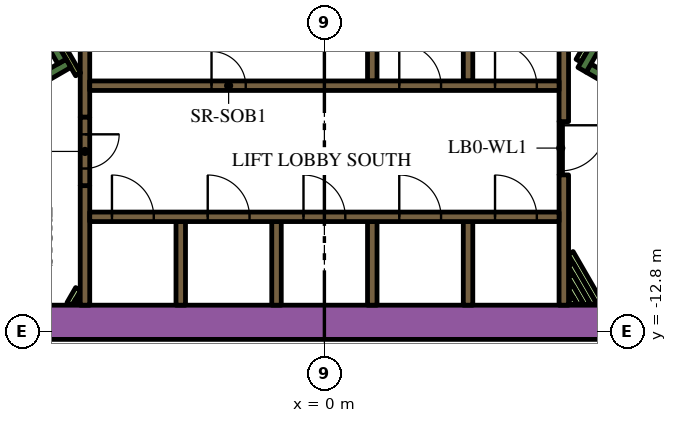
"""IFC4 building model, lengths in metres.
Left out: names, types, materials, properties, quantities, classifications, styles, units other than length and angle.
Written with IfcOpenShell. Run it as: python <this file> out.ifc"""

import sys

from ifc_helpers import new_model, si_unit, direction, frame, frame_2d, origin, place, context, subcontext, project, spatial, rectangle, extrude, element, fill, save


model = new_model("IFC4")
c1 = context("Model", 3, precision=1e-05, world=origin(), true_north=direction((0.0, 1.0)))
c2 = subcontext(c1, "Body", "Model", "MODEL_VIEW")
j1 = project(units=[si_unit("LENGTHUNIT", "METRE"), si_unit("PLANEANGLEUNIT", "RADIAN")], contexts=[c1])
p1 = place(None, origin())
s1 = spatial("IfcSite", under=j1, at=p1, CompositionType="ELEMENT")
p2 = place(p1, origin())
s2 = spatial("IfcBuilding", under=s1, at=p2, CompositionType="ELEMENT")
p3 = place(p2, frame((0.0, 0.0, 43.2)))
s3 = spatial("IfcBuildingStorey", under=s2, at=p3, CompositionType="ELEMENT", Elevation=43.2)
p4 = place(p3, frame((-12.019, -12.55, 0.0), z_axis=(0.0, 0.0, 1.0), x_axis=(1.0, 0.0, 0.0)))
e1 = element("IfcWall", 1, at=p4, inside=s3, PredefinedType="SOLIDWALL", context=c2, shape_type="SweptSolid", body=[
    extrude(rectangle(XDim=22.083, YDim=0.9, at=frame_2d((11.042, 0.0))), origin(), (0.0, 0.0, 1.0), 3.9),
])
p5 = place(p3, frame((12.84, -9.261, 0.0), z_axis=(0.0, 0.0, 1.0), x_axis=(-0.866013990052, 0.500019768644, 0.0)))
e2 = element("IfcWall", 2, at=p5, inside=s3, PredefinedType="SOLIDWALL", context=c2, shape_type="SweptSolid", body=[
    extrude(rectangle(XDim=6.8, YDim=0.25, at=frame_2d((3.4, 0.0))), origin(), (0.0, 0.0, 1.0), 3.9),
])
p6 = place(p3, frame((6.78, -5.906, 0.0), z_axis=(0.0, 0.0, 1.0), x_axis=(0.500223362819, 0.865896406789, 0.0)))
e3 = element("IfcWall", 3, at=p6, inside=s3, PredefinedType="SOLIDWALL", context=c2, shape_type="SweptSolid", body=[
    extrude(rectangle(XDim=0.675, YDim=0.25, at=frame_2d((0.337, 0.0))), origin(), (0.0, 0.0, 1.0), 3.9),
])
p7 = place(p3, frame((-12.84, -9.261, 0.0), z_axis=(0.0, 0.0, 1.0), x_axis=(0.866016039709, 0.500016218704, 0.0)))
e4 = element("IfcWall", 4, at=p7, inside=s3, PredefinedType="SOLIDWALL", context=c2, shape_type="SweptSolid", body=[
    extrude(rectangle(XDim=7.05, YDim=0.25, at=frame_2d((3.525, 0.0))), origin(), (0.0, 0.0, 1.0), 3.9),
])
p8 = place(p3, frame((-6.905, -5.69, 0.0), z_axis=(0.0, 0.0, 1.0), x_axis=(-0.500402024738, 0.865793170242, 0.0)))
e5 = element("IfcWall", 5, at=p8, inside=s3, PredefinedType="SOLIDWALL", context=c2, shape_type="SweptSolid", body=[
    extrude(rectangle(XDim=0.425, YDim=0.25, at=frame_2d((0.212, 0.0))), origin(), (0.0, 0.0, 1.0), 3.9),
])
p9 = place(p3, frame((-3.78, -12.1, 0.0), z_axis=(0.0, 0.0, 1.0), x_axis=(0.0, 1.0, 0.0)))
e6 = element("IfcWall", 6, at=p9, inside=s3, PredefinedType="SOLIDWALL", context=c2, shape_type="SweptSolid", body=[
    extrude(rectangle(XDim=2.2, YDim=0.25, at=frame_2d((1.1, 0.0))), origin(), (0.0, 0.0, 1.0), 3.9),
])
p10 = place(p3, frame((-6.3, -12.1, 0.0), z_axis=(0.0, 0.0, 1.0), x_axis=(0.0, 1.0, 0.0)))
e7 = element("IfcWall", 7, at=p10, inside=s3, PredefinedType="SOLIDWALL", context=c2, shape_type="SweptSolid", body=[
    extrude(rectangle(XDim=3.146, YDim=0.25, at=frame_2d((1.573, 0.0))), origin(), (0.0, 0.0, 1.0), 3.9),
])
for number, where, z_axis, x_axis in (
    (8, (3.78, -4.0, 0.0), (0.0, 0.0, 1.0), (0.0, -1.0, 0.0)),
    (9, (1.26, -4.0, 0.0), (0.0, 0.0, 1.0), (0.0, -1.0, 0.0)),
):
    element("IfcWall", number, at=place(p3, frame(where, z_axis=z_axis, x_axis=x_axis)), inside=s3, PredefinedType="SOLIDWALL", context=c2, shape_type="SweptSolid", body=[
        extrude(rectangle(XDim=2.2, YDim=0.25, at=frame_2d((1.1, 0.0))), origin(), (0.0, 0.0, 1.0), 3.9),
    ])
p11 = place(p3, frame((-6.3, -3.75, 0.0), z_axis=(0.0, 0.0, 1.0), x_axis=(0.0, -1.0, 0.0)))
e10 = element("IfcWall", 10, at=p11, inside=s3, PredefinedType="SOLIDWALL", context=c2, shape_type="SweptSolid", body=[
    extrude(rectangle(XDim=3.404, YDim=0.25, at=frame_2d((1.702, 0.0))), origin(), (0.0, 0.0, 1.0), 3.9),
])
p12 = place(p3, frame((6.3, -7.27, 0.0), z_axis=(0.0, 0.0, 1.0), x_axis=(0.0, 1.0, 0.0)))
e11 = element("IfcWall", 11, at=p12, inside=s3, PredefinedType="SOLIDWALL", context=c2, shape_type="SweptSolid", body=[
    extrude(rectangle(XDim=3.586, YDim=0.25, at=frame_2d((1.793, 0.0))), origin(), (0.0, 0.0, 1.0), 3.9),
])
p13 = place(p3, frame((6.3, -12.1, 0.0), z_axis=(0.0, 0.0, 1.0), x_axis=(0.0, 1.0, 0.0)))
e12 = element("IfcWall", 12, at=p13, inside=s3, PredefinedType="SOLIDWALL", context=c2, shape_type="SweptSolid", body=[
    extrude(rectangle(XDim=3.428, YDim=0.25, at=frame_2d((1.714, 0.0))), origin(), (0.0, 0.0, 1.0), 3.9),
])
for number, where, z_axis, x_axis in (
    (13, (3.78, -12.1, 0.0), (0.0, 0.0, 1.0), (0.0, 1.0, 0.0)),
    (14, (1.26, -12.1, 0.0), (0.0, 0.0, 1.0), (0.0, 1.0, 0.0)),
    (15, (-1.26, -12.1, 0.0), (0.0, 0.0, 1.0), (0.0, 1.0, 0.0)),
):
    element("IfcWall", number, at=place(p3, frame(where, z_axis=z_axis, x_axis=x_axis)), inside=s3, PredefinedType="SOLIDWALL", context=c2, shape_type="SweptSolid", body=[
        extrude(rectangle(XDim=2.2, YDim=0.25, at=frame_2d((1.1, 0.0))), origin(), (0.0, 0.0, 1.0), 3.9),
    ])
p14 = place(p3, frame((-6.708, -12.068, 0.0), z_axis=(0.0, 0.0, 1.0), x_axis=(0.500000789788, 0.8660249478, 0.0)))
e16 = element("IfcWall", 16, at=p14, inside=s3, PredefinedType="PARTITIONING", context=c2, shape_type="SweptSolid", body=[
    extrude(rectangle(XDim=0.456, YDim=0.15, at=frame_2d((0.228, 0.0))), origin(), (0.0, 0.0, 1.0), 2.75),
])
p15 = place(p3, frame((-6.534, -12.068, 0.0), z_axis=(0.0, 0.0, 1.0), x_axis=(0.500240224089, 0.865886665912, 0.0)))
e17 = element("IfcWall", 17, at=p15, inside=s3, PredefinedType="PARTITIONING", context=c2, shape_type="SweptSolid", body=[
    extrude(rectangle(XDim=0.109, YDim=0.15, at=frame_2d((0.054, 0.0))), origin(), (0.0, 0.0, 1.0), 2.75),
])
p16 = place(p3, frame((-6.48, -6.027, 0.0), z_axis=(0.0, 0.0, 1.0), x_axis=(-0.499927229454, 0.866067413802, 0.0)))
e18 = element("IfcWall", 18, at=p16, inside=s3, PredefinedType="PARTITIONING", context=c2, shape_type="SweptSolid", body=[
    extrude(rectangle(XDim=0.929, YDim=0.15, at=frame_2d((0.464, 0.0))), origin(), (0.0, 0.0, 1.0), 3.9),
])
p17 = place(p3, frame((6.48, -10.726, 0.0), z_axis=(0.0, 0.0, 1.0), x_axis=(0.500017819788, -0.86601511528, 0.0)))
e19 = element("IfcWall", 19, at=p17, inside=s3, PredefinedType="PARTITIONING", context=c2, shape_type="SweptSolid", body=[
    extrude(rectangle(XDim=1.55, YDim=0.15, at=frame_2d((0.775, 0.0))), origin(), (0.0, 0.0, 1.0), 2.75),
])
p18 = place(p3, frame((6.48, -11.026, 0.0), z_axis=(0.0, 0.0, 1.0), x_axis=(0.49995654735, -0.86605048973, 0.0)))
e20 = element("IfcWall", 20, at=p18, inside=s3, PredefinedType="PARTITIONING", context=c2, shape_type="SweptSolid", body=[
    extrude(rectangle(XDim=1.204, YDim=0.15, at=frame_2d((0.602, 0.0))), origin(), (0.0, 0.0, 1.0), 2.75),
])
p19 = place(p3, frame((6.48, -11.326, 0.0), z_axis=(0.0, 0.0, 1.0), x_axis=(0.500059337743, -0.865991142412, 0.0)))
e21 = element("IfcWall", 21, at=p19, inside=s3, PredefinedType="PARTITIONING", context=c2, shape_type="SweptSolid", body=[
    extrude(rectangle(XDim=0.857, YDim=0.15, at=frame_2d((0.429, 0.0))), origin(), (0.0, 0.0, 1.0), 2.75),
])
p20 = place(p3, frame((6.48, -11.626, 0.0), z_axis=(0.0, 0.0, 1.0), x_axis=(0.500301480982, -0.865851273677, 0.0)))
e22 = element("IfcWall", 22, at=p20, inside=s3, PredefinedType="PARTITIONING", context=c2, shape_type="SweptSolid", body=[
    extrude(rectangle(XDim=0.511, YDim=0.15, at=frame_2d((0.255, 0.0))), origin(), (0.0, 0.0, 1.0), 2.75),
])
p21 = place(p3, frame((6.48, -11.926, 0.0), z_axis=(0.0, 0.0, 1.0), x_axis=(0.500450775723, -0.86576499183, 0.0)))
e23 = element("IfcWall", 23, at=p21, inside=s3, PredefinedType="PARTITIONING", context=c2, shape_type="SweptSolid", body=[
    extrude(rectangle(XDim=0.164, YDim=0.15, at=frame_2d((0.082, 0.0))), origin(), (0.0, 0.0, 1.0), 2.75),
])
p22 = place(p3, frame((6.945, -5.222, 0.0), z_axis=(0.0, 0.0, 1.0), x_axis=(-0.499818422106, -0.866130212453, 0.0)))
e24 = element("IfcWall", 24, at=p22, inside=s3, PredefinedType="PARTITIONING", context=c2, shape_type="SweptSolid", body=[
    extrude(rectangle(XDim=0.514, YDim=0.15, at=frame_2d((0.257, 0.0))), origin(), (0.0, 0.0, 1.0), 2.75),
])
p23 = place(p3, frame((-6.175, -9.775, 0.0), z_axis=(0.0, 0.0, 1.0), x_axis=(1.0, 0.0, 0.0)))
e25 = element("IfcWall", 25, at=p23, inside=s3, PredefinedType="SOLIDWALL", context=c2, shape_type="SweptSolid", body=[
    extrude(rectangle(XDim=12.35, YDim=0.25, at=frame_2d((6.175, 0.0))), origin(), (0.0, 0.0, 1.0), 3.9),
])
p24 = place(p23, frame((0.585, 0.0, 0.0)))
e26 = element("IfcOpeningElement", 26, at=p24, cuts=e25, PredefinedType="OPENING", context=c2, shape_type="SweptSolid", body=[
    extrude(rectangle(XDim=1.1, YDim=2.1, at=frame_2d((0.55, 1.05))), frame((0.0, 0.135, 0.0), z_axis=(0.0, -1.0, 0.0), x_axis=(1.0, 0.0, 0.0)), (0.0, 0.0, 1.0), 0.27),
])
p25 = place(p23, frame((3.105, 0.0, 0.0)))
e27 = element("IfcOpeningElement", 27, at=p25, cuts=e25, PredefinedType="OPENING", context=c2, shape_type="SweptSolid", body=[
    extrude(rectangle(XDim=1.1, YDim=2.1, at=frame_2d((0.55, 1.05))), frame((0.0, 0.135, 0.0), z_axis=(0.0, -1.0, 0.0), x_axis=(1.0, 0.0, 0.0)), (0.0, 0.0, 1.0), 0.27),
])
p26 = place(p23, frame((5.625, 0.0, 0.0)))
e28 = element("IfcOpeningElement", 28, at=p26, cuts=e25, PredefinedType="OPENING", context=c2, shape_type="SweptSolid", body=[
    extrude(rectangle(XDim=1.1, YDim=2.1, at=frame_2d((0.55, 1.05))), frame((0.0, 0.135, 0.0), z_axis=(0.0, -1.0, 0.0), x_axis=(1.0, 0.0, 0.0)), (0.0, 0.0, 1.0), 0.27),
])
p27 = place(p23, frame((8.145, 0.0, 0.0)))
e29 = element("IfcOpeningElement", 29, at=p27, cuts=e25, PredefinedType="OPENING", context=c2, shape_type="SweptSolid", body=[
    extrude(rectangle(XDim=1.1, YDim=2.1, at=frame_2d((0.55, 1.05))), frame((0.0, 0.135, 0.0), z_axis=(0.0, -1.0, 0.0), x_axis=(1.0, 0.0, 0.0)), (0.0, 0.0, 1.0), 0.27),
])
p28 = place(p23, frame((10.665, 0.0, 0.0)))
e30 = element("IfcOpeningElement", 30, at=p28, cuts=e25, PredefinedType="OPENING", context=c2, shape_type="SweptSolid", body=[
    extrude(rectangle(XDim=1.1, YDim=2.1, at=frame_2d((0.55, 1.05))), frame((0.0, 0.135, 0.0), z_axis=(0.0, -1.0, 0.0), x_axis=(1.0, 0.0, 0.0)), (0.0, 0.0, 1.0), 0.27),
])
p29 = place(p3, frame((-6.175, -6.325, 0.0), z_axis=(0.0, 0.0, 1.0), x_axis=(1.0, 0.0, 0.0)))
e31 = element("IfcWall", 31, at=p29, inside=s3, PredefinedType="SOLIDWALL", context=c2, shape_type="SweptSolid", body=[
    extrude(rectangle(XDim=12.35, YDim=0.25, at=frame_2d((6.175, 0.0))), origin(), (0.0, 0.0, 1.0), 3.9),
])
p30 = place(p29, frame((3.205, 0.0, 0.0)))
e32 = element("IfcOpeningElement", 32, at=p30, cuts=e31, PredefinedType="OPENING", context=c2, shape_type="SweptSolid", body=[
    extrude(rectangle(XDim=0.9, YDim=2.1, at=frame_2d((0.45, 1.05))), frame((0.0, 0.135, 0.0), z_axis=(0.0, -1.0, 0.0), x_axis=(1.0, 0.0, 0.0)), (0.0, 0.0, 1.0), 0.27),
])
p31 = place(p29, frame((8.145, 0.0, 0.0)))
e33 = element("IfcOpeningElement", 33, at=p31, cuts=e31, PredefinedType="OPENING", context=c2, shape_type="SweptSolid", body=[
    extrude(rectangle(XDim=1.1, YDim=2.1, at=frame_2d((0.55, 1.05))), frame((0.0, 0.135, 0.0), z_axis=(0.0, -1.0, 0.0), x_axis=(1.0, 0.0, 0.0)), (0.0, 0.0, 1.0), 0.27),
])
p32 = place(p29, frame((10.665, 0.0, 0.0)))
e34 = element("IfcOpeningElement", 34, at=p32, cuts=e31, PredefinedType="OPENING", context=c2, shape_type="SweptSolid", body=[
    extrude(rectangle(XDim=1.1, YDim=2.1, at=frame_2d((0.55, 1.05))), frame((0.0, 0.135, 0.0), z_axis=(0.0, -1.0, 0.0), x_axis=(1.0, 0.0, 0.0)), (0.0, 0.0, 1.0), 0.27),
])
p33 = place(p3, frame((-6.3, -7.154, 0.0), z_axis=(0.0, 0.0, 1.0), x_axis=(0.0, -1.0, 0.0)))
e35 = element("IfcWall", 35, at=p33, inside=s3, PredefinedType="SOLIDWALL", context=c2, shape_type="SweptSolid", body=[
    extrude(rectangle(XDim=1.8, YDim=0.25, at=frame_2d((0.9, 0.0))), origin(), (0.0, 0.0, 1.0), 3.9),
])
p34 = place(p33, frame((0.45, 0.0, 0.0)))
e36 = element("IfcOpeningElement", 36, at=p34, cuts=e35, PredefinedType="OPENING", context=c2, shape_type="SweptSolid", body=[
    extrude(rectangle(XDim=0.9, YDim=2.1, at=frame_2d((0.45, 1.05))), frame((0.0, 0.135, 0.0), z_axis=(0.0, -1.0, 0.0), x_axis=(1.0, 0.0, 0.0)), (0.0, 0.0, 1.0), 0.27),
])
p35 = place(p3, frame((6.22, -7.266, 0.0), z_axis=(0.0, 0.0, 1.0), x_axis=(0.0, -1.0, 0.0)))
e37 = element("IfcWall", 37, at=p35, inside=s3, PredefinedType="PARTITIONING", context=c2, shape_type="SweptSolid", body=[
    extrude(rectangle(XDim=1.4, YDim=0.09, at=frame_2d((0.7, 0.0))), origin(), (0.0, 0.0, 1.0), 2.75),
])
p36 = place(p35, frame((0.1, 0.0, 0.0)))
e38 = element("IfcOpeningElement", 38, at=p36, cuts=e37, PredefinedType="OPENING", context=c2, shape_type="SweptSolid", body=[
    extrude(rectangle(XDim=1.2, YDim=2.1, at=frame_2d((0.6, 1.05))), frame((0.0, 0.055, 0.0), z_axis=(0.0, -1.0, 0.0), x_axis=(1.0, 0.0, 0.0)), (0.0, 0.0, 1.0), 0.11),
])
p37 = place(p24, origin())
e39 = element("IfcDoor", 39, at=p37, inside=s3, OperationType="DOUBLE_DOOR_SLIDING", PredefinedType="DOOR", context=c2, shape_type="SweptSolid", body=[
    extrude(rectangle(XDim=1.1, YDim=2.1, at=frame_2d((0.55, 1.05))), frame((0.0, 0.025, 0.0), z_axis=(0.0, -1.0, 0.0), x_axis=(1.0, 0.0, 0.0)), (0.0, 0.0, 1.0), 0.05),
])
fill(e26, e39)
p38 = place(p25, origin())
e40 = element("IfcDoor", 40, at=p38, inside=s3, OperationType="DOUBLE_DOOR_SLIDING", PredefinedType="DOOR", context=c2, shape_type="SweptSolid", body=[
    extrude(rectangle(XDim=1.1, YDim=2.1, at=frame_2d((0.55, 1.05))), frame((0.0, 0.025, 0.0), z_axis=(0.0, -1.0, 0.0), x_axis=(1.0, 0.0, 0.0)), (0.0, 0.0, 1.0), 0.05),
])
fill(e27, e40)
p39 = place(p26, origin())
e41 = element("IfcDoor", 41, at=p39, inside=s3, OperationType="DOUBLE_DOOR_SLIDING", PredefinedType="DOOR", context=c2, shape_type="SweptSolid", body=[
    extrude(rectangle(XDim=1.1, YDim=2.1, at=frame_2d((0.55, 1.05))), frame((0.0, 0.025, 0.0), z_axis=(0.0, -1.0, 0.0), x_axis=(1.0, 0.0, 0.0)), (0.0, 0.0, 1.0), 0.05),
])
fill(e28, e41)
p40 = place(p27, origin())
e42 = element("IfcDoor", 42, at=p40, inside=s3, OperationType="DOUBLE_DOOR_SLIDING", PredefinedType="DOOR", context=c2, shape_type="SweptSolid", body=[
    extrude(rectangle(XDim=1.1, YDim=2.1, at=frame_2d((0.55, 1.05))), frame((0.0, 0.025, 0.0), z_axis=(0.0, -1.0, 0.0), x_axis=(1.0, 0.0, 0.0)), (0.0, 0.0, 1.0), 0.05),
])
fill(e29, e42)
p41 = place(p28, origin())
e43 = element("IfcDoor", 43, at=p41, inside=s3, OperationType="DOUBLE_DOOR_SLIDING", PredefinedType="DOOR", context=c2, shape_type="SweptSolid", body=[
    extrude(rectangle(XDim=1.1, YDim=2.1, at=frame_2d((0.55, 1.05))), frame((0.0, 0.025, 0.0), z_axis=(0.0, -1.0, 0.0), x_axis=(1.0, 0.0, 0.0)), (0.0, 0.0, 1.0), 0.05),
])
fill(e30, e43)
p42 = place(p30, origin())
e44 = element("IfcDoor", 44, at=p42, inside=s3, OperationType="SINGLE_SWING_LEFT", PredefinedType="DOOR", context=c2, shape_type="SweptSolid", body=[
    extrude(rectangle(XDim=0.9, YDim=2.1, at=frame_2d((0.45, 1.05))), frame((0.0, 0.025, 0.0), z_axis=(0.0, -1.0, 0.0), x_axis=(1.0, 0.0, 0.0)), (0.0, 0.0, 1.0), 0.05),
])
fill(e32, e44)
p43 = place(p31, origin())
e45 = element("IfcDoor", 45, at=p43, inside=s3, OperationType="DOUBLE_DOOR_SLIDING", PredefinedType="DOOR", context=c2, shape_type="SweptSolid", body=[
    extrude(rectangle(XDim=1.1, YDim=2.1, at=frame_2d((0.55, 1.05))), frame((0.0, 0.025, 0.0), z_axis=(0.0, -1.0, 0.0), x_axis=(1.0, 0.0, 0.0)), (0.0, 0.0, 1.0), 0.05),
])
fill(e33, e45)
p44 = place(p32, origin())
e46 = element("IfcDoor", 46, at=p44, inside=s3, OperationType="DOUBLE_DOOR_SLIDING", PredefinedType="DOOR", context=c2, shape_type="SweptSolid", body=[
    extrude(rectangle(XDim=1.1, YDim=2.1, at=frame_2d((0.55, 1.05))), frame((0.0, 0.025, 0.0), z_axis=(0.0, -1.0, 0.0), x_axis=(1.0, 0.0, 0.0)), (0.0, 0.0, 1.0), 0.05),
])
fill(e34, e46)
p45 = place(p34, origin())
e47 = element("IfcDoor", 47, at=p45, inside=s3, OperationType="SINGLE_SWING_LEFT", PredefinedType="DOOR", context=c2, shape_type="SweptSolid", body=[
    extrude(rectangle(XDim=0.9, YDim=2.1, at=frame_2d((0.45, 1.05))), frame((0.0, 0.025, 0.0), z_axis=(0.0, -1.0, 0.0), x_axis=(1.0, 0.0, 0.0)), (0.0, 0.0, 1.0), 0.05),
])
fill(e36, e47)
p46 = place(p36, origin())
e48 = element("IfcDoor", 48, at=p46, inside=s3, OperationType="SINGLE_SWING_LEFT", PredefinedType="DOOR", context=c2, shape_type="SweptSolid", body=[
    extrude(rectangle(XDim=1.2, YDim=2.1, at=frame_2d((0.6, 1.05))), frame((0.0, 0.025, 0.0), z_axis=(0.0, -1.0, 0.0), x_axis=(1.0, 0.0, 0.0)), (0.0, 0.0, 1.0), 0.05),
])
fill(e38, e48)
save(model, sys.argv[1])
